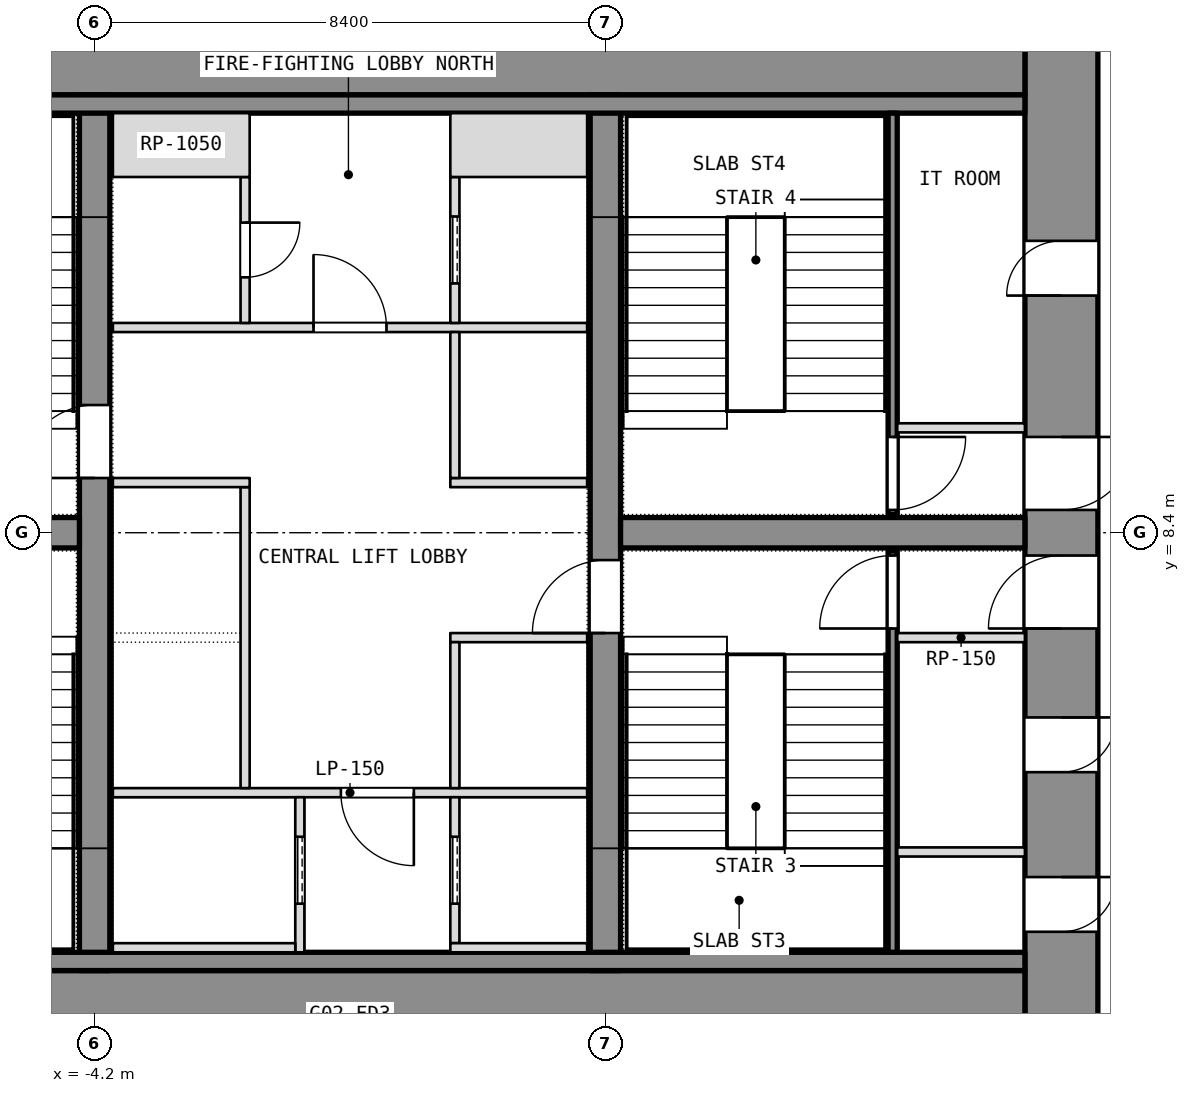
"""IFC4 building model, lengths in metres.
Left out: names, types, materials, properties, quantities, classifications, styles, units other than length and angle.
Written with IfcOpenShell. Run it as: python <this file> out.ifc"""

import sys

from ifc_helpers import new_model, si_unit, direction, frame, frame_2d, origin, place, context, subcontext, project, spatial, rectangle, extrude, element, fill, save


model = new_model("IFC4")
c1 = context("Model", 3, precision=1e-05, world=origin(), true_north=direction((0.0, 1.0)))
c2 = subcontext(c1, "Body", "Model", "MODEL_VIEW")
j1 = project(units=[si_unit("LENGTHUNIT", "METRE"), si_unit("PLANEANGLEUNIT", "RADIAN")], contexts=[c1])
p1 = place(None, origin())
s1 = spatial("IfcSite", under=j1, at=p1, CompositionType="ELEMENT")
p2 = place(p1, origin())
s2 = spatial("IfcBuilding", under=s1, at=p2, CompositionType="ELEMENT")
p3 = place(p2, frame((0.0, 0.0, 43.7)))
s3 = spatial("IfcBuildingStorey", under=s2, at=p3, CompositionType="ELEMENT", Elevation=43.7)
p4 = place(p3, frame((11.7, 0.0, 0.0), z_axis=(0.0, 0.0, 1.0), x_axis=(0.0, 1.0, 0.0)))
e1 = element("IfcWall", 1, at=p4, inside=s3, PredefinedType="SHEAR", context=c2, shape_type="SweptSolid", body=[
    extrude(rectangle(XDim=16.8, YDim=1.2, at=frame_2d((8.4, 0.0))), origin(), (0.0, 0.0, 1.0), 3.6),
])
p5 = place(p4, frame((1.837, 0.0, 0.0)))
e2 = element("IfcOpeningElement", 2, at=p5, cuts=e1, PredefinedType="OPENING", context=c2, shape_type="SweptSolid", body=[
    extrude(rectangle(XDim=0.9, YDim=2.1, at=frame_2d((0.45, 1.05))), frame((0.0, 0.6, 0.0), z_axis=(0.0, -1.0, 0.0), x_axis=(1.0, 0.0, 0.0)), (0.0, 0.0, 1.0), 1.2),
])
p6 = place(p4, frame((4.462, 0.0, 0.0)))
e3 = element("IfcOpeningElement", 3, at=p6, cuts=e1, PredefinedType="OPENING", context=c2, shape_type="SweptSolid", body=[
    extrude(rectangle(XDim=0.9, YDim=2.1, at=frame_2d((0.45, 1.05))), frame((0.0, 0.6, 0.0), z_axis=(0.0, -1.0, 0.0), x_axis=(1.0, 0.0, 0.0)), (0.0, 0.0, 1.0), 1.2),
])
p7 = place(p4, frame((6.825, 0.0, 0.0)))
e4 = element("IfcOpeningElement", 4, at=p7, cuts=e1, PredefinedType="OPENING", context=c2, shape_type="SweptSolid", body=[
    extrude(rectangle(XDim=1.2, YDim=2.1, at=frame_2d((0.6, 1.05))), frame((0.0, 0.6, 0.0), z_axis=(0.0, -1.0, 0.0), x_axis=(1.0, 0.0, 0.0)), (0.0, 0.0, 1.0), 1.2),
])
p8 = place(p4, frame((12.3, 0.0, 0.0)))
e5 = element("IfcOpeningElement", 5, at=p8, cuts=e1, PredefinedType="OPENING", context=c2, shape_type="SweptSolid", body=[
    extrude(rectangle(XDim=0.9, YDim=2.1, at=frame_2d((0.45, 1.05))), frame((0.0, 0.6, 0.0), z_axis=(0.0, -1.0, 0.0), x_axis=(1.0, 0.0, 0.0)), (0.0, 0.0, 1.0), 1.2),
])
p9 = place(p4, frame((8.775, 0.0, 0.0)))
e6 = element("IfcOpeningElement", 6, at=p9, cuts=e1, PredefinedType="OPENING", context=c2, shape_type="SweptSolid", body=[
    extrude(rectangle(XDim=1.2, YDim=2.1, at=frame_2d((0.6, 1.05))), frame((0.0, 0.6, 0.0), z_axis=(0.0, -1.0, 0.0), x_axis=(1.0, 0.0, 0.0)), (0.0, 0.0, 1.0), 1.2),
])
for number, where, z_axis, x_axis in (
    (7, (-11.1, 0.6, 0.0), (0.0, 0.0, 1.0), (1.0, 0.0, 0.0)),
    (8, (-11.1, 16.2, 0.0), (0.0, 0.0, 1.0), (1.0, 0.0, 0.0)),
):
    element("IfcWall", number, at=place(p3, frame(where, z_axis=z_axis, x_axis=x_axis)), inside=s3, PredefinedType="SHEAR", context=c2, shape_type="SweptSolid", body=[
        extrude(rectangle(XDim=22.2, YDim=1.2, at=frame_2d((11.1, 0.0))), origin(), (0.0, 0.0, 1.0), 3.6),
    ])
p10 = place(p3, frame((-4.2, 1.2, 0.0), z_axis=(0.0, 0.0, 1.0), x_axis=(0.0, 1.0, 0.0)))
e9 = element("IfcWall", 9, at=p10, inside=s3, PredefinedType="SHEAR", context=c2, shape_type="SweptSolid", body=[
    extrude(rectangle(XDim=14.4, YDim=0.5, at=frame_2d((7.2, 0.0))), origin(), (0.0, 0.0, 1.0), 3.6),
])
p11 = place(p10, frame((8.1, 0.0, 0.0)))
e10 = element("IfcOpeningElement", 10, at=p11, cuts=e9, PredefinedType="OPENING", context=c2, shape_type="SweptSolid", body=[
    extrude(rectangle(XDim=1.2, YDim=2.1, at=frame_2d((0.6, 1.05))), frame((0.0, 0.25, 0.0), z_axis=(0.0, -1.0, 0.0), x_axis=(1.0, 0.0, 0.0)), (0.0, 0.0, 1.0), 0.5),
])
p12 = place(p3, frame((4.2, 1.2, 0.0), z_axis=(0.0, 0.0, 1.0), x_axis=(0.0, 1.0, 0.0)))
e11 = element("IfcWall", 11, at=p12, inside=s3, PredefinedType="SHEAR", context=c2, shape_type="SweptSolid", body=[
    extrude(rectangle(XDim=14.4, YDim=0.5, at=frame_2d((7.2, 0.0))), origin(), (0.0, 0.0, 1.0), 3.6),
])
p13 = place(p12, frame((5.55, 0.0, 0.0)))
e12 = element("IfcOpeningElement", 12, at=p13, cuts=e11, PredefinedType="OPENING", context=c2, shape_type="SweptSolid", body=[
    extrude(rectangle(XDim=1.2, YDim=2.1, at=frame_2d((0.6, 1.05))), frame((0.0, 0.25, 0.0), z_axis=(0.0, -1.0, 0.0), x_axis=(1.0, 0.0, 0.0)), (0.0, 0.0, 1.0), 0.5),
])
for number, where, z_axis, x_axis in (
    (13, (-11.1, 8.4, 0.0), (0.0, 0.0, 1.0), (1.0, 0.0, 0.0)),
    (14, (4.45, 8.4, 0.0), (0.0, 0.0, 1.0), (1.0, 0.0, 0.0)),
):
    element("IfcWall", number, at=place(p3, frame(where, z_axis=z_axis, x_axis=x_axis)), inside=s3, PredefinedType="SHEAR", context=c2, shape_type="SweptSolid", body=[
        extrude(rectangle(XDim=6.65, YDim=0.5, at=frame_2d((3.325, 0.0))), origin(), (0.0, 0.0, 1.0), 3.6),
    ])
for number, where, z_axis, x_axis in (
    (15, (-11.1, 1.35, 0.0), (0.0, 0.0, 1.0), (1.0, 0.0, 0.0)),
    (16, (-11.1, 15.45, 0.0), (0.0, 0.0, 1.0), (1.0, 0.0, 0.0)),
):
    element("IfcWall", number, at=place(p3, frame(where, z_axis=z_axis, x_axis=x_axis)), inside=s3, PredefinedType="PARTITIONING", context=c2, shape_type="SweptSolid", body=[
        extrude(rectangle(XDim=22.2, YDim=0.3, at=frame_2d((11.1, 0.0))), origin(), (0.0, 0.0, 1.0), 3.34),
    ])
p14 = place(p3, frame((8.925, 1.5, 0.0), z_axis=(0.0, 0.0, 1.0), x_axis=(0.0, 1.0, 0.0)))
e17 = element("IfcWall", 17, at=p14, inside=s3, PredefinedType="SHEAR", context=c2, shape_type="SweptSolid", body=[
    extrude(rectangle(XDim=6.6, YDim=0.15, at=frame_2d((3.3, 0.0))), origin(), (0.0, 0.0, 1.0), 3.34),
])
p15 = place(p14, frame((5.325, 0.0, 0.0)))
e18 = element("IfcOpeningElement", 18, at=p15, cuts=e17, PredefinedType="OPENING", context=c2, shape_type="SweptSolid", body=[
    extrude(rectangle(XDim=1.2, YDim=2.1, at=frame_2d((0.6, 1.05))), frame((0.0, 0.075, 0.0), z_axis=(0.0, -1.0, 0.0), x_axis=(1.0, 0.0, 0.0)), (0.0, 0.0, 1.0), 0.15),
])
for number, where, z_axis, x_axis in (
    (19, (9.0, 6.675, 0.0), (0.0, 0.0, 1.0), (1.0, 0.0, 0.0)),
    (20, (9.0, 3.15, 0.0), (0.0, 0.0, 1.0), (1.0, 0.0, 0.0)),
):
    element("IfcWall", number, at=place(p3, frame(where, z_axis=z_axis, x_axis=x_axis)), inside=s3, PredefinedType="PARTITIONING", context=c2, shape_type="SweptSolid", body=[
        extrude(rectangle(XDim=2.1, YDim=0.15, at=frame_2d((1.05, 0.0))), origin(), (0.0, 0.0, 1.0), 3.34),
    ])
p16 = place(p3, frame((8.925, 8.7, 0.0), z_axis=(0.0, 0.0, 1.0), x_axis=(0.0, 1.0, 0.0)))
e21 = element("IfcWall", 21, at=p16, inside=s3, PredefinedType="SHEAR", context=c2, shape_type="SweptSolid", body=[
    extrude(rectangle(XDim=6.6, YDim=0.15, at=frame_2d((3.3, 0.0))), origin(), (0.0, 0.0, 1.0), 3.34),
])
p17 = place(p16, frame((0.075, 0.0, 0.0)))
e22 = element("IfcOpeningElement", 22, at=p17, cuts=e21, PredefinedType="OPENING", context=c2, shape_type="SweptSolid", body=[
    extrude(rectangle(XDim=1.2, YDim=2.1, at=frame_2d((0.6, 1.05))), frame((0.0, 0.075, 0.0), z_axis=(0.0, -1.0, 0.0), x_axis=(1.0, 0.0, 0.0)), (0.0, 0.0, 1.0), 0.15),
])
p18 = place(p3, frame((9.0, 10.125, 0.0), z_axis=(0.0, 0.0, 1.0), x_axis=(1.0, 0.0, 0.0)))
e23 = element("IfcWall", 23, at=p18, inside=s3, PredefinedType="PARTITIONING", context=c2, shape_type="SweptSolid", body=[
    extrude(rectangle(XDim=2.1, YDim=0.15, at=frame_2d((1.05, 0.0))), origin(), (0.0, 0.0, 1.0), 3.34),
])
p19 = place(p3, frame((-3.9, 4.125, 0.0), z_axis=(0.0, 0.0, 1.0), x_axis=(1.0, 0.0, 0.0)))
e24 = element("IfcWall", 24, at=p19, inside=s3, PredefinedType="PARTITIONING", context=c2, shape_type="SweptSolid", body=[
    extrude(rectangle(XDim=7.8, YDim=0.15, at=frame_2d((3.9, 0.0))), origin(), (0.0, 0.0, 1.0), 3.34),
])
p20 = place(p19, frame((3.75, 0.0, 0.0)))
e25 = element("IfcOpeningElement", 25, at=p20, cuts=e24, PredefinedType="OPENING", context=c2, shape_type="SweptSolid", body=[
    extrude(rectangle(XDim=1.2, YDim=2.1, at=frame_2d((0.6, 1.05))), frame((0.0, 0.075, 0.0), z_axis=(0.0, -1.0, 0.0), x_axis=(1.0, 0.0, 0.0)), (0.0, 0.0, 1.0), 0.15),
])
p21 = place(p3, frame((-3.9, 11.775, 0.0), z_axis=(0.0, 0.0, 1.0), x_axis=(1.0, 0.0, 0.0)))
e26 = element("IfcWall", 26, at=p21, inside=s3, PredefinedType="PARTITIONING", context=c2, shape_type="SweptSolid", body=[
    extrude(rectangle(XDim=7.8, YDim=0.15, at=frame_2d((3.9, 0.0))), origin(), (0.0, 0.0, 1.0), 3.34),
])
p22 = place(p21, frame((3.3, 0.0, 0.0)))
e27 = element("IfcOpeningElement", 27, at=p22, cuts=e26, PredefinedType="OPENING", context=c2, shape_type="SweptSolid", body=[
    extrude(rectangle(XDim=1.2, YDim=2.1, at=frame_2d((0.6, 1.05))), frame((0.0, 0.075, 0.0), z_axis=(0.0, -1.0, 0.0), x_axis=(1.0, 0.0, 0.0)), (0.0, 0.0, 1.0), 0.15),
])
p23 = place(p3, frame((-0.825, 1.5, 0.0), z_axis=(0.0, 0.0, 1.0), x_axis=(0.0, 1.0, 0.0)))
e28 = element("IfcWall", 28, at=p23, inside=s3, PredefinedType="SHEAR", context=c2, shape_type="SweptSolid", body=[
    extrude(rectangle(XDim=2.55, YDim=0.15, at=frame_2d((1.275, 0.0))), origin(), (0.0, 0.0, 1.0), 3.6),
])
p24 = place(p23, frame((0.8, 0.0, 0.0)))
e29 = element("IfcOpeningElement", 29, at=p24, cuts=e28, PredefinedType="OPENING", context=c2, shape_type="SweptSolid", body=[
    extrude(rectangle(XDim=1.1, YDim=2.1, at=frame_2d((0.55, 1.05))), frame((0.0, 0.075, 0.0), z_axis=(0.0, -1.0, 0.0), x_axis=(1.0, 0.0, 0.0)), (0.0, 0.0, 1.0), 0.15),
])
p25 = place(p3, frame((-3.9, 1.575, 0.0), z_axis=(0.0, 0.0, 1.0), x_axis=(1.0, 0.0, 0.0)))
e30 = element("IfcWall", 30, at=p25, inside=s3, PredefinedType="SHEAR", context=c2, shape_type="SweptSolid", body=[
    extrude(rectangle(XDim=3.0, YDim=0.15, at=frame_2d((1.5, 0.0))), origin(), (0.0, 0.0, 1.0), 3.6),
])
p26 = place(p3, frame((-1.725, 4.2, 0.0), z_axis=(0.0, 0.0, 1.0), x_axis=(0.0, 1.0, 0.0)))
e31 = element("IfcWall", 31, at=p26, inside=s3, PredefinedType="SHEAR", context=c2, shape_type="SweptSolid", body=[
    extrude(rectangle(XDim=4.95, YDim=0.15, at=frame_2d((2.475, 0.0))), origin(), (0.0, 0.0, 1.0), 3.6),
])
p27 = place(p3, frame((-3.9, 9.225, 0.0), z_axis=(0.0, 0.0, 1.0), x_axis=(1.0, 0.0, 0.0)))
e32 = element("IfcWall", 32, at=p27, inside=s3, PredefinedType="SHEAR", context=c2, shape_type="SweptSolid", body=[
    extrude(rectangle(XDim=2.25, YDim=0.15, at=frame_2d((1.125, 0.0))), origin(), (0.0, 0.0, 1.0), 3.6),
])
p28 = place(p3, frame((-1.725, 11.85, 0.0), z_axis=(0.0, 0.0, 1.0), x_axis=(0.0, 1.0, 0.0)))
e33 = element("IfcWall", 33, at=p28, inside=s3, PredefinedType="PARTITIONING", context=c2, shape_type="SweptSolid", body=[
    extrude(rectangle(XDim=2.4, YDim=0.15, at=frame_2d((1.2, 0.0))), origin(), (0.0, 0.0, 1.0), 3.34),
])
p29 = place(p28, frame((0.75, 0.0, 0.0)))
e34 = element("IfcOpeningElement", 34, at=p29, cuts=e33, PredefinedType="OPENING", context=c2, shape_type="SweptSolid", body=[
    extrude(rectangle(XDim=0.9, YDim=2.1, at=frame_2d((0.45, 1.05))), frame((0.0, 0.075, 0.0), z_axis=(0.0, -1.0, 0.0), x_axis=(1.0, 0.0, 0.0)), (0.0, 0.0, 1.0), 0.15),
])
p30 = place(p3, frame((-3.9, 14.775, 0.0), z_axis=(0.0, 0.0, 1.0), x_axis=(1.0, 0.0, 0.0)))
e35 = element("IfcWall", 35, at=p30, inside=s3, PredefinedType="PARTITIONING", context=c2, shape_type="SweptSolid", body=[
    extrude(rectangle(XDim=2.25, YDim=1.05, at=frame_2d((1.125, 0.0))), origin(), (0.0, 0.0, 1.0), 3.34),
])
p31 = place(p3, frame((1.725, 1.65, 0.0), z_axis=(0.0, 0.0, 1.0), x_axis=(0.0, 1.0, 0.0)))
e36 = element("IfcWall", 36, at=p31, inside=s3, PredefinedType="SHEAR", context=c2, shape_type="SweptSolid", body=[
    extrude(rectangle(XDim=2.4, YDim=0.15, at=frame_2d((1.2, 0.0))), origin(), (0.0, 0.0, 1.0), 3.6),
])
p32 = place(p31, frame((0.65, 0.0, 0.0)))
e37 = element("IfcOpeningElement", 37, at=p32, cuts=e36, PredefinedType="OPENING", context=c2, shape_type="SweptSolid", body=[
    extrude(rectangle(XDim=1.1, YDim=2.1, at=frame_2d((0.55, 1.05))), frame((0.0, 0.075, 0.0), z_axis=(0.0, -1.0, 0.0), x_axis=(1.0, 0.0, 0.0)), (0.0, 0.0, 1.0), 0.15),
])
p33 = place(p3, frame((1.65, 1.575, 0.0), z_axis=(0.0, 0.0, 1.0), x_axis=(1.0, 0.0, 0.0)))
e38 = element("IfcWall", 38, at=p33, inside=s3, PredefinedType="SHEAR", context=c2, shape_type="SweptSolid", body=[
    extrude(rectangle(XDim=2.25, YDim=0.15, at=frame_2d((1.125, 0.0))), origin(), (0.0, 0.0, 1.0), 3.6),
])
p34 = place(p3, frame((1.725, 11.85, 0.0), z_axis=(0.0, 0.0, 1.0), x_axis=(0.0, 1.0, 0.0)))
e39 = element("IfcWall", 39, at=p34, inside=s3, PredefinedType="SHEAR", context=c2, shape_type="SweptSolid", body=[
    extrude(rectangle(XDim=2.4, YDim=0.15, at=frame_2d((1.2, 0.0))), origin(), (0.0, 0.0, 1.0), 3.6),
])
p35 = place(p34, frame((0.65, 0.0, 0.0)))
e40 = element("IfcOpeningElement", 40, at=p35, cuts=e39, PredefinedType="OPENING", context=c2, shape_type="SweptSolid", body=[
    extrude(rectangle(XDim=1.1, YDim=2.1, at=frame_2d((0.55, 1.05))), frame((0.0, 0.075, 0.0), z_axis=(0.0, -1.0, 0.0), x_axis=(1.0, 0.0, 0.0)), (0.0, 0.0, 1.0), 0.15),
])
p36 = place(p3, frame((1.65, 14.775, 0.0), z_axis=(0.0, 0.0, 1.0), x_axis=(1.0, 0.0, 0.0)))
e41 = element("IfcWall", 41, at=p36, inside=s3, PredefinedType="SHEAR", context=c2, shape_type="SweptSolid", body=[
    extrude(rectangle(XDim=2.25, YDim=1.05, at=frame_2d((1.125, 0.0))), origin(), (0.0, 0.0, 1.0), 3.6),
])
for number, where, z_axis, x_axis in (
    (42, (1.65, 6.675, 0.0), (0.0, 0.0, 1.0), (1.0, 0.0, 0.0)),
    (43, (1.65, 9.225, 0.0), (0.0, 0.0, 1.0), (1.0, 0.0, 0.0)),
):
    element("IfcWall", number, at=place(p3, frame(where, z_axis=z_axis, x_axis=x_axis)), inside=s3, PredefinedType="SHEAR", context=c2, shape_type="SweptSolid", body=[
        extrude(rectangle(XDim=2.25, YDim=0.15, at=frame_2d((1.125, 0.0))), origin(), (0.0, 0.0, 1.0), 3.6),
    ])
p37 = place(p3, frame((1.725, 4.2, 0.0), z_axis=(0.0, 0.0, 1.0), x_axis=(0.0, 1.0, 0.0)))
e44 = element("IfcWall", 44, at=p37, inside=s3, PredefinedType="SHEAR", context=c2, shape_type="SweptSolid", body=[
    extrude(rectangle(XDim=2.4, YDim=0.15, at=frame_2d((1.2, 0.0))), origin(), (0.0, 0.0, 1.0), 3.6),
])
p38 = place(p3, frame((1.725, 9.3, 0.0), z_axis=(0.0, 0.0, 1.0), x_axis=(0.0, 1.0, 0.0)))
e45 = element("IfcWall", 45, at=p38, inside=s3, PredefinedType="SHEAR", context=c2, shape_type="SweptSolid", body=[
    extrude(rectangle(XDim=2.4, YDim=0.15, at=frame_2d((1.2, 0.0))), origin(), (0.0, 0.0, 1.0), 3.6),
])
p39 = place(p5, origin())
e46 = element("IfcDoor", 46, at=p39, inside=s3, OperationType="SINGLE_SWING_LEFT", PredefinedType="DOOR", context=c2, shape_type="SweptSolid", body=[
    extrude(rectangle(XDim=0.9, YDim=2.1, at=frame_2d((0.45, 1.05))), frame((0.0, 0.025, 0.0), z_axis=(0.0, -1.0, 0.0), x_axis=(1.0, 0.0, 0.0)), (0.0, 0.0, 1.0), 0.05),
])
fill(e2, e46)
p40 = place(p6, origin())
e47 = element("IfcDoor", 47, at=p40, inside=s3, OperationType="SINGLE_SWING_LEFT", PredefinedType="DOOR", context=c2, shape_type="SweptSolid", body=[
    extrude(rectangle(XDim=0.9, YDim=2.1, at=frame_2d((0.45, 1.05))), frame((0.0, 0.025, 0.0), z_axis=(0.0, -1.0, 0.0), x_axis=(1.0, 0.0, 0.0)), (0.0, 0.0, 1.0), 0.05),
])
fill(e3, e47)
p41 = place(p7, origin())
e48 = element("IfcDoor", 48, at=p41, inside=s3, OperationType="SINGLE_SWING_LEFT", PredefinedType="DOOR", context=c2, shape_type="SweptSolid", body=[
    extrude(rectangle(XDim=1.2, YDim=2.1, at=frame_2d((0.6, 1.05))), frame((0.0, 0.025, 0.0), z_axis=(0.0, -1.0, 0.0), x_axis=(1.0, 0.0, 0.0)), (0.0, 0.0, 1.0), 0.05),
])
fill(e4, e48)
p42 = place(p15, origin())
e49 = element("IfcDoor", 49, at=p42, inside=s3, OperationType="SINGLE_SWING_LEFT", PredefinedType="DOOR", context=c2, shape_type="SweptSolid", body=[
    extrude(rectangle(XDim=1.2, YDim=2.1, at=frame_2d((0.6, 1.05))), frame((0.0, 0.025, 0.0), z_axis=(0.0, -1.0, 0.0), x_axis=(1.0, 0.0, 0.0)), (0.0, 0.0, 1.0), 0.05),
])
fill(e18, e49)
p43 = place(p8, origin())
e50 = element("IfcDoor", 50, at=p43, inside=s3, OperationType="SINGLE_SWING_LEFT", PredefinedType="DOOR", context=c2, shape_type="SweptSolid", body=[
    extrude(rectangle(XDim=0.9, YDim=2.1, at=frame_2d((0.45, 1.05))), frame((0.0, 0.025, 0.0), z_axis=(0.0, -1.0, 0.0), x_axis=(1.0, 0.0, 0.0)), (0.0, 0.0, 1.0), 0.05),
])
fill(e5, e50)
p44 = place(p9, origin())
e51 = element("IfcDoor", 51, at=p44, inside=s3, OperationType="SINGLE_SWING_LEFT", PredefinedType="DOOR", context=c2, shape_type="SweptSolid", body=[
    extrude(rectangle(XDim=1.2, YDim=2.1, at=frame_2d((0.6, 1.05))), frame((0.0, 0.025, 0.0), z_axis=(0.0, -1.0, 0.0), x_axis=(1.0, 0.0, 0.0)), (0.0, 0.0, 1.0), 0.05),
])
fill(e6, e51)
p45 = place(p17, origin())
e52 = element("IfcDoor", 52, at=p45, inside=s3, OperationType="SINGLE_SWING_LEFT", PredefinedType="DOOR", context=c2, shape_type="SweptSolid", body=[
    extrude(rectangle(XDim=1.2, YDim=2.1, at=frame_2d((0.6, 1.05))), frame((0.0, 0.025, 0.0), z_axis=(0.0, -1.0, 0.0), x_axis=(1.0, 0.0, 0.0)), (0.0, 0.0, 1.0), 0.05),
])
fill(e22, e52)
p46 = place(p24, origin())
e53 = element("IfcDoor", 53, at=p46, inside=s3, OperationType="SLIDING_TO_LEFT", PredefinedType="DOOR", context=c2, shape_type="SweptSolid", body=[
    extrude(rectangle(XDim=1.1, YDim=2.1, at=frame_2d((0.55, 1.05))), frame((0.0, 0.025, 0.0), z_axis=(0.0, -1.0, 0.0), x_axis=(1.0, 0.0, 0.0)), (0.0, 0.0, 1.0), 0.05),
])
fill(e29, e53)
p47 = place(p32, origin())
e54 = element("IfcDoor", 54, at=p47, inside=s3, OperationType="SLIDING_TO_LEFT", PredefinedType="DOOR", context=c2, shape_type="SweptSolid", body=[
    extrude(rectangle(XDim=1.1, YDim=2.1, at=frame_2d((0.55, 1.05))), frame((0.0, 0.025, 0.0), z_axis=(0.0, -1.0, 0.0), x_axis=(1.0, 0.0, 0.0)), (0.0, 0.0, 1.0), 0.05),
])
fill(e37, e54)
p48 = place(p35, origin())
e55 = element("IfcDoor", 55, at=p48, inside=s3, OperationType="SLIDING_TO_LEFT", PredefinedType="DOOR", context=c2, shape_type="SweptSolid", body=[
    extrude(rectangle(XDim=1.1, YDim=2.1, at=frame_2d((0.55, 1.05))), frame((0.0, 0.025, 0.0), z_axis=(0.0, -1.0, 0.0), x_axis=(1.0, 0.0, 0.0)), (0.0, 0.0, 1.0), 0.05),
])
fill(e40, e55)
p49 = place(p20, origin())
e56 = element("IfcDoor", 56, at=p49, inside=s3, OperationType="SINGLE_SWING_LEFT", PredefinedType="DOOR", context=c2, shape_type="SweptSolid", body=[
    extrude(rectangle(XDim=1.2, YDim=2.1, at=frame_2d((0.6, 1.05))), frame((0.0, 0.025, 0.0), z_axis=(0.0, -1.0, 0.0), x_axis=(1.0, 0.0, 0.0)), (0.0, 0.0, 1.0), 0.05),
])
fill(e25, e56)
p50 = place(p22, origin())
e57 = element("IfcDoor", 57, at=p50, inside=s3, OperationType="SINGLE_SWING_LEFT", PredefinedType="DOOR", context=c2, shape_type="SweptSolid", body=[
    extrude(rectangle(XDim=1.2, YDim=2.1, at=frame_2d((0.6, 1.05))), frame((0.0, 0.025, 0.0), z_axis=(0.0, -1.0, 0.0), x_axis=(1.0, 0.0, 0.0)), (0.0, 0.0, 1.0), 0.05),
])
fill(e27, e57)
p51 = place(p29, origin())
e58 = element("IfcDoor", 58, at=p51, inside=s3, OperationType="SINGLE_SWING_LEFT", PredefinedType="DOOR", context=c2, shape_type="SweptSolid", body=[
    extrude(rectangle(XDim=0.9, YDim=2.1, at=frame_2d((0.45, 1.05))), frame((0.0, 0.025, 0.0), z_axis=(0.0, -1.0, 0.0), x_axis=(1.0, 0.0, 0.0)), (0.0, 0.0, 1.0), 0.05),
])
fill(e34, e58)
p52 = place(p11, origin())
e59 = element("IfcDoor", 59, at=p52, inside=s3, OperationType="SINGLE_SWING_LEFT", PredefinedType="DOOR", context=c2, shape_type="SweptSolid", body=[
    extrude(rectangle(XDim=1.2, YDim=2.1, at=frame_2d((0.6, 1.05))), frame((0.0, 0.025, 0.0), z_axis=(0.0, -1.0, 0.0), x_axis=(1.0, 0.0, 0.0)), (0.0, 0.0, 1.0), 0.05),
])
fill(e10, e59)
p53 = place(p13, origin())
e60 = element("IfcDoor", 60, at=p53, inside=s3, OperationType="SINGLE_SWING_LEFT", PredefinedType="DOOR", context=c2, shape_type="SweptSolid", body=[
    extrude(rectangle(XDim=1.2, YDim=2.1, at=frame_2d((0.6, 1.05))), frame((0.0, 0.025, 0.0), z_axis=(0.0, -1.0, 0.0), x_axis=(1.0, 0.0, 0.0)), (0.0, 0.0, 1.0), 0.05),
])
fill(e12, e60)
save(model, sys.argv[1])
